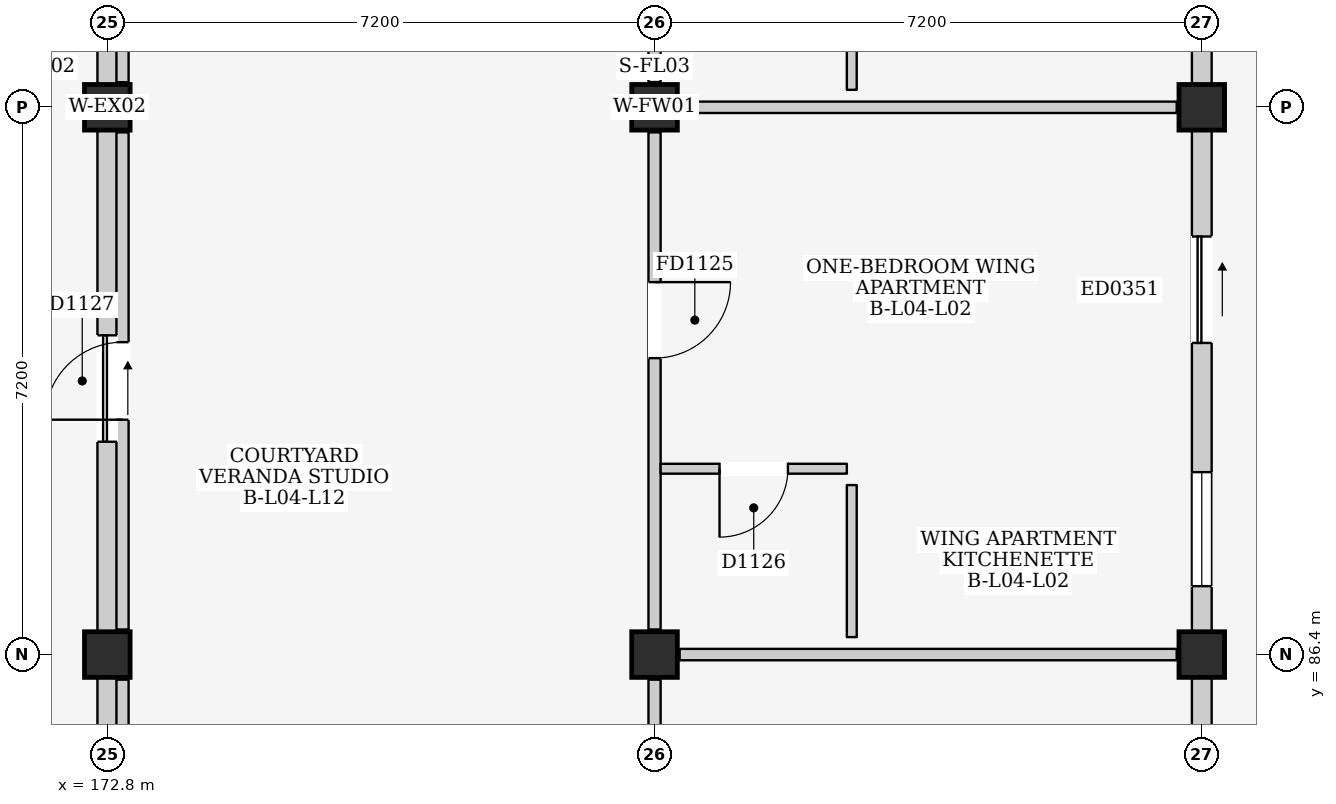
"""IFC4 building model, lengths in metres.
Left out: names, types, materials, properties, quantities, classifications, styles, units other than length and angle.
Written with IfcOpenShell. Run it as: python <this file> out.ifc"""

import sys

from ifc_helpers import new_model, si_unit, direction, frame, frame_2d, origin, origin_2d, place, context, subcontext, project, spatial, rectangle, extrude, element, fill, save


model = new_model("IFC4")
c1 = context("Model", 3, precision=1e-05, world=origin(), true_north=direction((0.0, 1.0)))
c2 = subcontext(c1, "Body", "Model", "MODEL_VIEW")
j1 = project(units=[si_unit("LENGTHUNIT", "METRE"), si_unit("PLANEANGLEUNIT", "RADIAN")], contexts=[c1])
p1 = place(None, origin())
s1 = spatial("IfcSite", under=j1, at=p1, CompositionType="ELEMENT")
p2 = place(p1, origin())
s2 = spatial("IfcBuilding", under=s1, at=p2, CompositionType="ELEMENT")
p3 = place(p2, frame((0.0, 0.0, 15.4)))
s3 = spatial("IfcBuildingStorey", under=s2, at=p3, CompositionType="ELEMENT", Elevation=15.4)
for number, where, z_axis, x_axis in (
    (1, (172.8, 86.4, 0.0), (0.0, 0.0, 1.0), (1.0, 0.0, 0.0)),
    (2, (172.8, 93.6, 0.0), (0.0, 0.0, 1.0), (1.0, 0.0, 0.0)),
    (3, (180.0, 86.4, 0.0), (0.0, 0.0, 1.0), (1.0, 0.0, 0.0)),
    (4, (180.0, 93.6, 0.0), (0.0, 0.0, 1.0), (1.0, 0.0, 0.0)),
    (5, (187.2, 86.4, 0.0), (0.0, 0.0, 1.0), (1.0, 0.0, 0.0)),
    (6, (187.2, 93.6, 0.0), (0.0, 0.0, 1.0), (1.0, 0.0, 0.0)),
):
    element("IfcColumn", number, at=place(p3, frame(where, z_axis=z_axis, x_axis=x_axis)), inside=s3, PredefinedType="COLUMN", context=c2, shape_type="SweptSolid", body=[
        extrude(rectangle(XDim=0.6, YDim=0.6, at=origin_2d()), origin(), (0.0, 0.0, 1.0), 3.2),
    ])
p4 = place(p3, frame((172.8, 79.5, 0.0), z_axis=(0.0, 0.0, 1.0), x_axis=(0.0, 1.0, 0.0)))
e7 = element("IfcWall", 7, at=p4, inside=s3, PredefinedType="ELEMENTEDWALL", context=c2, shape_type="SweptSolid", body=[
    extrude(rectangle(XDim=6.6, YDim=0.26, at=frame_2d((3.3, 0.0))), origin(), (0.0, 0.0, 1.0), 2.385),
])
p5 = place(p4, frame((2.5, 0.0, 0.0)))
e8 = element("IfcOpeningElement", 8, at=p5, cuts=e7, PredefinedType="OPENING", context=c2, shape_type="SweptSolid", body=[
    extrude(rectangle(XDim=1.4, YDim=2.1, at=frame_2d((0.7, 1.05))), frame((0.0, 0.145, 0.0), z_axis=(0.0, -1.0, 0.0), x_axis=(1.0, 0.0, 0.0)), (0.0, 0.0, 1.0), 0.29),
])
p6 = place(p3, frame((172.8, 86.7, 0.0), z_axis=(0.0, 0.0, 1.0), x_axis=(0.0, 1.0, 0.0)))
e9 = element("IfcWall", 9, at=p6, inside=s3, PredefinedType="ELEMENTEDWALL", context=c2, shape_type="SweptSolid", body=[
    extrude(rectangle(XDim=6.6, YDim=0.26, at=frame_2d((3.3, 0.0))), origin(), (0.0, 0.0, 1.0), 2.385),
])
p7 = place(p6, frame((2.5, 0.0, 0.0)))
e10 = element("IfcOpeningElement", 10, at=p7, cuts=e9, PredefinedType="OPENING", context=c2, shape_type="SweptSolid", body=[
    extrude(rectangle(XDim=1.4, YDim=2.1, at=frame_2d((0.7, 1.05))), frame((0.0, 0.145, 0.0), z_axis=(0.0, -1.0, 0.0), x_axis=(1.0, 0.0, 0.0)), (0.0, 0.0, 1.0), 0.29),
])
p8 = place(p3, frame((172.8, 93.9, 0.0), z_axis=(0.0, 0.0, 1.0), x_axis=(0.0, 1.0, 0.0)))
e11 = element("IfcWall", 11, at=p8, inside=s3, PredefinedType="ELEMENTEDWALL", context=c2, shape_type="SweptSolid", body=[
    extrude(rectangle(XDim=6.6, YDim=0.26, at=frame_2d((3.3, 0.0))), origin(), (0.0, 0.0, 1.0), 2.385),
])
p9 = place(p8, frame((2.5, 0.0, 0.0)))
e12 = element("IfcOpeningElement", 12, at=p9, cuts=e11, PredefinedType="OPENING", context=c2, shape_type="SweptSolid", body=[
    extrude(rectangle(XDim=1.4, YDim=2.1, at=frame_2d((0.7, 1.05))), frame((0.0, 0.145, 0.0), z_axis=(0.0, -1.0, 0.0), x_axis=(1.0, 0.0, 0.0)), (0.0, 0.0, 1.0), 0.29),
])
p10 = place(p3, frame((187.2, 79.5, 0.0), z_axis=(0.0, 0.0, 1.0), x_axis=(0.0, 1.0, 0.0)))
e13 = element("IfcWall", 13, at=p10, inside=s3, PredefinedType="ELEMENTEDWALL", context=c2, shape_type="SweptSolid", body=[
    extrude(rectangle(XDim=6.6, YDim=0.26, at=frame_2d((3.3, 0.0))), origin(), (0.0, 0.0, 1.0), 2.43),
])
p11 = place(p10, frame((3.8, 0.0, 0.0)))
e14 = element("IfcOpeningElement", 14, at=p11, cuts=e13, PredefinedType="OPENING", context=c2, shape_type="SweptSolid", body=[
    extrude(rectangle(XDim=1.4, YDim=2.1, at=frame_2d((0.7, 1.05))), frame((0.0, 0.145, 0.0), z_axis=(0.0, -1.0, 0.0), x_axis=(1.0, 0.0, 0.0)), (0.0, 0.0, 1.0), 0.29),
])
p12 = place(p10, frame((0.6, 0.0, 0.81)))
e15 = element("IfcOpeningElement", 15, at=p12, cuts=e13, PredefinedType="OPENING", context=c2, shape_type="SweptSolid", body=[
    extrude(rectangle(XDim=1.5, YDim=1.5, at=frame_2d((0.75, 0.75))), frame((0.0, 0.145, 0.0), z_axis=(0.0, -1.0, 0.0), x_axis=(1.0, 0.0, 0.0)), (0.0, 0.0, 1.0), 0.29),
])
p13 = place(p3, frame((187.2, 86.7, 0.0), z_axis=(0.0, 0.0, 1.0), x_axis=(0.0, 1.0, 0.0)))
e16 = element("IfcWall", 16, at=p13, inside=s3, PredefinedType="ELEMENTEDWALL", context=c2, shape_type="SweptSolid", body=[
    extrude(rectangle(XDim=6.6, YDim=0.26, at=frame_2d((3.3, 0.0))), origin(), (0.0, 0.0, 1.0), 2.43),
])
p14 = place(p13, frame((3.8, 0.0, 0.0)))
e17 = element("IfcOpeningElement", 17, at=p14, cuts=e16, PredefinedType="OPENING", context=c2, shape_type="SweptSolid", body=[
    extrude(rectangle(XDim=1.4, YDim=2.1, at=frame_2d((0.7, 1.05))), frame((0.0, 0.145, 0.0), z_axis=(0.0, -1.0, 0.0), x_axis=(1.0, 0.0, 0.0)), (0.0, 0.0, 1.0), 0.29),
])
p15 = place(p13, frame((0.6, 0.0, 0.81)))
e18 = element("IfcOpeningElement", 18, at=p15, cuts=e16, PredefinedType="OPENING", context=c2, shape_type="SweptSolid", body=[
    extrude(rectangle(XDim=1.5, YDim=1.5, at=frame_2d((0.75, 0.75))), frame((0.0, 0.145, 0.0), z_axis=(0.0, -1.0, 0.0), x_axis=(1.0, 0.0, 0.0)), (0.0, 0.0, 1.0), 0.29),
])
p16 = place(p3, frame((187.2, 93.9, 0.0), z_axis=(0.0, 0.0, 1.0), x_axis=(0.0, 1.0, 0.0)))
e19 = element("IfcWall", 19, at=p16, inside=s3, PredefinedType="ELEMENTEDWALL", context=c2, shape_type="SweptSolid", body=[
    extrude(rectangle(XDim=6.6, YDim=0.26, at=frame_2d((3.3, 0.0))), origin(), (0.0, 0.0, 1.0), 2.43),
])
p17 = place(p16, frame((3.8, 0.0, 0.0)))
e20 = element("IfcOpeningElement", 20, at=p17, cuts=e19, PredefinedType="OPENING", context=c2, shape_type="SweptSolid", body=[
    extrude(rectangle(XDim=1.4, YDim=2.1, at=frame_2d((0.7, 1.05))), frame((0.0, 0.145, 0.0), z_axis=(0.0, -1.0, 0.0), x_axis=(1.0, 0.0, 0.0)), (0.0, 0.0, 1.0), 0.29),
])
p18 = place(p16, frame((0.6, 0.0, 0.81)))
e21 = element("IfcOpeningElement", 21, at=p18, cuts=e19, PredefinedType="OPENING", context=c2, shape_type="SweptSolid", body=[
    extrude(rectangle(XDim=1.5, YDim=1.5, at=frame_2d((0.75, 0.75))), frame((0.0, 0.145, 0.0), z_axis=(0.0, -1.0, 0.0), x_axis=(1.0, 0.0, 0.0)), (0.0, 0.0, 1.0), 0.29),
])
p19 = place(p3, frame((180.0, 79.53, 0.0), z_axis=(0.0, 0.0, 1.0), x_axis=(0.0, 1.0, 0.0)))
e22 = element("IfcWall", 22, at=p19, inside=s3, PredefinedType="PARTITIONING", context=c2, shape_type="SweptSolid", body=[
    extrude(rectangle(XDim=6.54, YDim=0.16, at=frame_2d((3.27, 0.0))), origin(), (0.0, 0.0, 1.0), 2.385),
])
p20 = place(p19, frame((3.57, 0.0, 0.0)))
e23 = element("IfcOpeningElement", 23, at=p20, cuts=e22, PredefinedType="OPENING", context=c2, shape_type="SweptSolid", body=[
    extrude(rectangle(XDim=1.0, YDim=2.15, at=frame_2d((0.5, 1.075))), frame((0.0, 0.095, 0.0), z_axis=(0.0, -1.0, 0.0), x_axis=(1.0, 0.0, 0.0)), (0.0, 0.0, 1.0), 0.19),
])
p21 = place(p3, frame((180.33, 86.4, 0.0), z_axis=(0.0, 0.0, 1.0), x_axis=(1.0, 0.0, 0.0)))
e24 = element("IfcWall", 24, at=p21, inside=s3, PredefinedType="PARTITIONING", context=c2, shape_type="SweptSolid", body=[
    extrude(rectangle(XDim=6.54, YDim=0.15, at=frame_2d((3.27, 0.0))), origin(), (0.0, 0.0, 1.0), 2.335),
])
p22 = place(p3, frame((173.0, 79.53, 0.0), z_axis=(0.0, 0.0, 1.0), x_axis=(0.0, 1.0, 0.0)))
e25 = element("IfcWall", 25, at=p22, inside=s3, PredefinedType="PARTITIONING", context=c2, shape_type="SweptSolid", body=[
    extrude(rectangle(XDim=6.54, YDim=0.16, at=frame_2d((3.27, 0.0))), origin(), (0.0, 0.0, 1.0), 2.385),
])
p23 = place(p22, frame((2.76, 0.0, 0.0)))
e26 = element("IfcOpeningElement", 26, at=p23, cuts=e25, PredefinedType="OPENING", context=c2, shape_type="SweptSolid", body=[
    extrude(rectangle(XDim=1.02, YDim=2.18, at=frame_2d((0.51, 1.09))), frame((0.0, 0.095, 0.0), z_axis=(0.0, -1.0, 0.0), x_axis=(1.0, 0.0, 0.0)), (0.0, 0.0, 1.0), 0.19),
])
p24 = place(p3, frame((180.0, 86.73, 0.0), z_axis=(0.0, 0.0, 1.0), x_axis=(0.0, 1.0, 0.0)))
e27 = element("IfcWall", 27, at=p24, inside=s3, PredefinedType="PARTITIONING", context=c2, shape_type="SweptSolid", body=[
    extrude(rectangle(XDim=6.54, YDim=0.16, at=frame_2d((3.27, 0.0))), origin(), (0.0, 0.0, 1.0), 2.385),
])
p25 = place(p24, frame((3.57, 0.0, 0.0)))
e28 = element("IfcOpeningElement", 28, at=p25, cuts=e27, PredefinedType="OPENING", context=c2, shape_type="SweptSolid", body=[
    extrude(rectangle(XDim=1.0, YDim=2.15, at=frame_2d((0.5, 1.075))), frame((0.0, 0.095, 0.0), z_axis=(0.0, -1.0, 0.0), x_axis=(1.0, 0.0, 0.0)), (0.0, 0.0, 1.0), 0.19),
])
p26 = place(p3, frame((180.33, 93.6, 0.0), z_axis=(0.0, 0.0, 1.0), x_axis=(1.0, 0.0, 0.0)))
e29 = element("IfcWall", 29, at=p26, inside=s3, PredefinedType="PARTITIONING", context=c2, shape_type="SweptSolid", body=[
    extrude(rectangle(XDim=6.54, YDim=0.15, at=frame_2d((3.27, 0.0))), origin(), (0.0, 0.0, 1.0), 2.335),
])
p27 = place(p3, frame((180.08, 88.845, 0.0), z_axis=(0.0, 0.0, 1.0), x_axis=(1.0, 0.0, 0.0)))
e30 = element("IfcWall", 30, at=p27, inside=s3, PredefinedType="PARTITIONING", context=c2, shape_type="SweptSolid", body=[
    extrude(rectangle(XDim=2.45, YDim=0.13, at=frame_2d((1.225, 0.0))), origin(), (0.0, 0.0, 1.0), 2.95),
])
p28 = place(p27, frame((0.775, 0.0, 0.0)))
e31 = element("IfcOpeningElement", 31, at=p28, cuts=e30, PredefinedType="OPENING", context=c2, shape_type="SweptSolid", body=[
    extrude(rectangle(XDim=0.9, YDim=2.1, at=frame_2d((0.45, 1.05))), frame((0.0, 0.08, 0.0), z_axis=(0.0, -1.0, 0.0), x_axis=(1.0, 0.0, 0.0)), (0.0, 0.0, 1.0), 0.16),
])
p29 = place(p3, frame((182.595, 86.63, 0.0), z_axis=(0.0, 0.0, 1.0), x_axis=(0.0, 1.0, 0.0)))
e32 = element("IfcWall", 32, at=p29, inside=s3, PredefinedType="PARTITIONING", context=c2, shape_type="SweptSolid", body=[
    extrude(rectangle(XDim=2.0, YDim=0.13, at=frame_2d((1.0, 0.0))), origin(), (0.0, 0.0, 1.0), 2.95),
])
p30 = place(p3, frame((173.0, 86.73, 0.0), z_axis=(0.0, 0.0, 1.0), x_axis=(0.0, 1.0, 0.0)))
e33 = element("IfcWall", 33, at=p30, inside=s3, PredefinedType="PARTITIONING", context=c2, shape_type="SweptSolid", body=[
    extrude(rectangle(XDim=6.54, YDim=0.16, at=frame_2d((3.27, 0.0))), origin(), (0.0, 0.0, 1.0), 2.385),
])
p31 = place(p30, frame((2.76, 0.0, 0.0)))
e34 = element("IfcOpeningElement", 34, at=p31, cuts=e33, PredefinedType="OPENING", context=c2, shape_type="SweptSolid", body=[
    extrude(rectangle(XDim=1.02, YDim=2.18, at=frame_2d((0.51, 1.09))), frame((0.0, 0.095, 0.0), z_axis=(0.0, -1.0, 0.0), x_axis=(1.0, 0.0, 0.0)), (0.0, 0.0, 1.0), 0.19),
])
p32 = place(p3, frame((180.0, 93.93, 0.0), z_axis=(0.0, 0.0, 1.0), x_axis=(0.0, 1.0, 0.0)))
e35 = element("IfcWall", 35, at=p32, inside=s3, PredefinedType="PARTITIONING", context=c2, shape_type="SweptSolid", body=[
    extrude(rectangle(XDim=6.54, YDim=0.16, at=frame_2d((3.27, 0.0))), origin(), (0.0, 0.0, 1.0), 2.385),
])
p33 = place(p32, frame((3.57, 0.0, 0.0)))
e36 = element("IfcOpeningElement", 36, at=p33, cuts=e35, PredefinedType="OPENING", context=c2, shape_type="SweptSolid", body=[
    extrude(rectangle(XDim=1.0, YDim=2.15, at=frame_2d((0.5, 1.075))), frame((0.0, 0.095, 0.0), z_axis=(0.0, -1.0, 0.0), x_axis=(1.0, 0.0, 0.0)), (0.0, 0.0, 1.0), 0.19),
])
p34 = place(p3, frame((182.595, 93.83, 0.0), z_axis=(0.0, 0.0, 1.0), x_axis=(0.0, 1.0, 0.0)))
e37 = element("IfcWall", 37, at=p34, inside=s3, PredefinedType="PARTITIONING", context=c2, shape_type="SweptSolid", body=[
    extrude(rectangle(XDim=2.0, YDim=0.13, at=frame_2d((1.0, 0.0))), origin(), (0.0, 0.0, 1.0), 2.95),
])
p35 = place(p3, frame((173.0, 93.93, 0.0), z_axis=(0.0, 0.0, 1.0), x_axis=(0.0, 1.0, 0.0)))
e38 = element("IfcWall", 38, at=p35, inside=s3, PredefinedType="PARTITIONING", context=c2, shape_type="SweptSolid", body=[
    extrude(rectangle(XDim=6.54, YDim=0.16, at=frame_2d((3.27, 0.0))), origin(), (0.0, 0.0, 1.0), 2.385),
])
p36 = place(p35, frame((2.76, 0.0, 0.0)))
e39 = element("IfcOpeningElement", 39, at=p36, cuts=e38, PredefinedType="OPENING", context=c2, shape_type="SweptSolid", body=[
    extrude(rectangle(XDim=1.02, YDim=2.18, at=frame_2d((0.51, 1.09))), frame((0.0, 0.095, 0.0), z_axis=(0.0, -1.0, 0.0), x_axis=(1.0, 0.0, 0.0)), (0.0, 0.0, 1.0), 0.19),
])
p37 = place(p7, frame((1.4, 0.0, 0.0), z_axis=(0.0, 0.0, 1.0), x_axis=(-1.0, 0.0, 0.0)))
e40 = element("IfcDoor", 40, at=p37, inside=s3, OperationType="SLIDING_TO_RIGHT", PredefinedType="DOOR", context=c2, shape_type="SweptSolid", body=[
    extrude(rectangle(XDim=1.4, YDim=2.1, at=frame_2d((0.7, 1.05))), frame((0.0, 0.025, 0.0), z_axis=(0.0, -1.0, 0.0), x_axis=(1.0, 0.0, 0.0)), (0.0, 0.0, 1.0), 0.05),
])
fill(e10, e40)
p38 = place(p14, frame((1.4, 0.0, 0.0), z_axis=(0.0, 0.0, 1.0), x_axis=(-1.0, 0.0, 0.0)))
e41 = element("IfcDoor", 41, at=p38, inside=s3, OperationType="SLIDING_TO_RIGHT", PredefinedType="DOOR", context=c2, shape_type="SweptSolid", body=[
    extrude(rectangle(XDim=1.4, YDim=2.1, at=frame_2d((0.7, 1.05))), frame((0.0, 0.025, 0.0), z_axis=(0.0, -1.0, 0.0), x_axis=(1.0, 0.0, 0.0)), (0.0, 0.0, 1.0), 0.05),
])
fill(e17, e41)
p39 = place(p15, origin())
e42 = element("IfcWindow", 42, at=p39, inside=s3, PartitioningType="DOUBLE_PANEL_VERTICAL", PredefinedType="WINDOW", context=c2, shape_type="SweptSolid", body=[
    extrude(rectangle(XDim=1.5, YDim=1.5, at=frame_2d((0.75, 0.75))), frame((0.0, 0.03, 0.0), z_axis=(0.0, -1.0, 0.0), x_axis=(1.0, 0.0, 0.0)), (0.0, 0.0, 1.0), 0.06),
])
fill(e18, e42)
p40 = place(p25, frame((1.0, 0.0, 0.0), z_axis=(0.0, 0.0, 1.0), x_axis=(-1.0, 0.0, 0.0)))
e43 = element("IfcDoor", 43, at=p40, inside=s3, OperationType="SINGLE_SWING_LEFT", PredefinedType="DOOR", context=c2, shape_type="SweptSolid", body=[
    extrude(rectangle(XDim=1.0, YDim=2.15, at=frame_2d((0.5, 1.075))), frame((0.0, 0.025, 0.0), z_axis=(0.0, -1.0, 0.0), x_axis=(1.0, 0.0, 0.0)), (0.0, 0.0, 1.0), 0.05),
])
fill(e28, e43)
p41 = place(p28, frame((0.9, 0.0, 0.0), z_axis=(0.0, 0.0, 1.0), x_axis=(-1.0, 0.0, 0.0)))
e44 = element("IfcDoor", 44, at=p41, inside=s3, OperationType="SINGLE_SWING_RIGHT", PredefinedType="DOOR", context=c2, shape_type="SweptSolid", body=[
    extrude(rectangle(XDim=0.9, YDim=2.1, at=frame_2d((0.45, 1.05))), frame((0.0, 0.025, 0.0), z_axis=(0.0, -1.0, 0.0), x_axis=(1.0, 0.0, 0.0)), (0.0, 0.0, 1.0), 0.05),
])
fill(e31, e44)
p42 = place(p31, origin())
e45 = element("IfcDoor", 45, at=p42, inside=s3, OperationType="SINGLE_SWING_LEFT", PredefinedType="DOOR", context=c2, shape_type="SweptSolid", body=[
    extrude(rectangle(XDim=1.02, YDim=2.18, at=frame_2d((0.51, 1.09))), frame((0.0, 0.025, 0.0), z_axis=(0.0, -1.0, 0.0), x_axis=(1.0, 0.0, 0.0)), (0.0, 0.0, 1.0), 0.05),
])
fill(e34, e45)
save(model, sys.argv[1])
